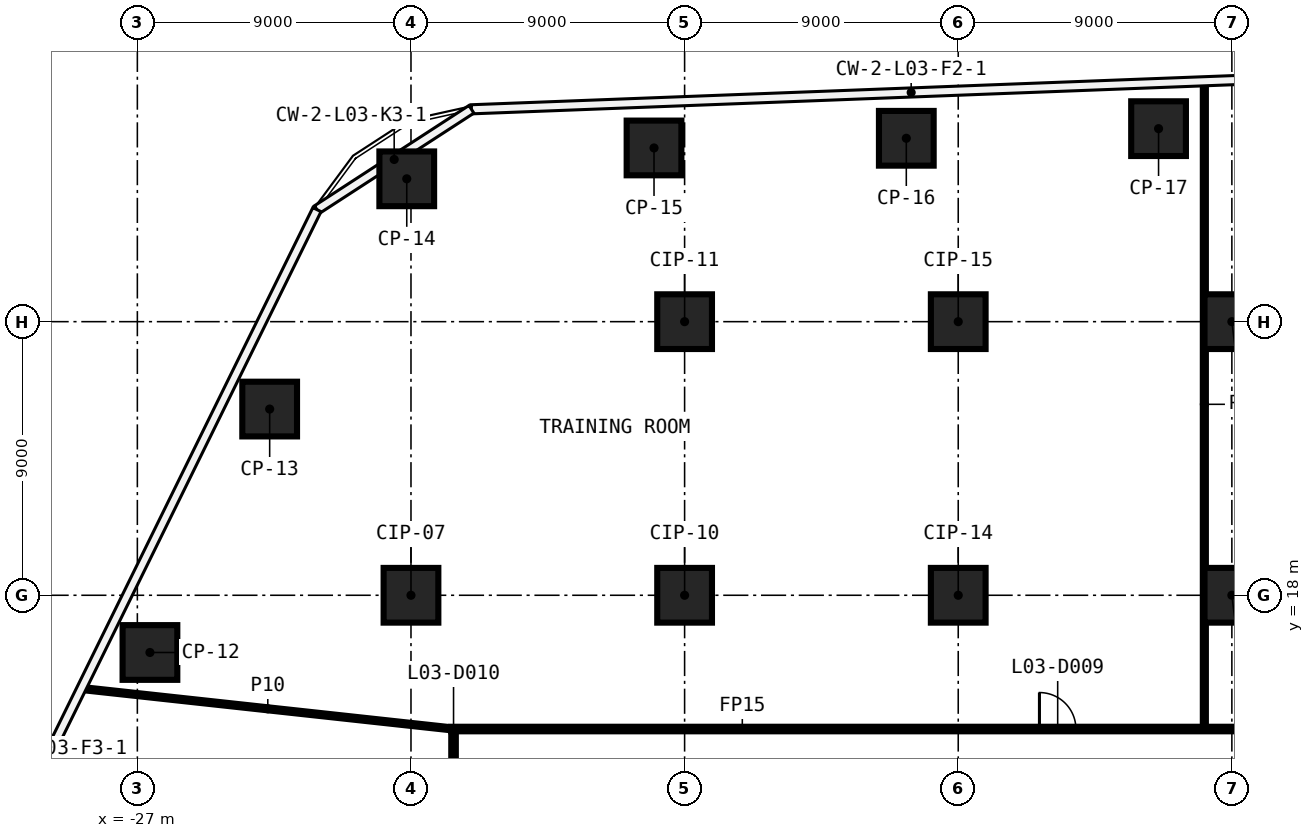
"""IFC4 building model, lengths in metres.
Left out: names, types, materials, properties, quantities, classifications, styles, units other than length and angle.
Written with IfcOpenShell. Run it as: python <this file> out.ifc"""

import sys

from ifc_helpers import new_model, si_unit, direction, frame, frame_2d, origin, origin_2d, place, context, subcontext, project, spatial, rectangle, extrude, element, fill, save


model = new_model("IFC4")
c1 = context("Model", 3, precision=1e-05, world=origin(), true_north=direction((0.0, 1.0)))
c2 = subcontext(c1, "Body", "Model", "MODEL_VIEW")
j1 = project(units=[si_unit("LENGTHUNIT", "METRE"), si_unit("PLANEANGLEUNIT", "RADIAN")], contexts=[c1])
p1 = place(None, origin())
s1 = spatial("IfcSite", under=j1, at=p1, CompositionType="ELEMENT")
p2 = place(p1, origin())
s2 = spatial("IfcBuilding", under=s1, at=p2, CompositionType="ELEMENT")
p3 = place(p2, frame((0.0, 0.0, 27.0)))
s3 = spatial("IfcBuildingStorey", under=s2, at=p3, CompositionType="ELEMENT", Elevation=27.0)
for number, where, z_axis, x_axis in (
    (1, (-26.586, 16.118, 0.0), (0.0, 0.0, 1.0), (1.0, 0.0, 0.0)),
    (2, (-22.648, 24.125, 0.0), (0.0, 0.0, 1.0), (1.0, 0.0, 0.0)),
    (3, (-18.139, 31.699, 0.0), (0.0, 0.0, 1.0), (1.0, 0.0, 0.0)),
    (4, (-10.006, 32.714, 0.0), (0.0, 0.0, 1.0), (1.0, 0.0, 0.0)),
    (5, (-1.708, 33.032, 0.0), (0.0, 0.0, 1.0), (1.0, 0.0, 0.0)),
    (6, (6.589, 33.349, 0.0), (0.0, 0.0, 1.0), (1.0, 0.0, 0.0)),
    (7, (-18.0, 18.0, 0.0), (0.0, 0.0, 1.0), (1.0, 0.0, 0.0)),
    (8, (-9.0, 18.0, 0.0), (0.0, 0.0, 1.0), (1.0, 0.0, 0.0)),
    (9, (-9.0, 27.0, 0.0), (0.0, 0.0, 1.0), (1.0, 0.0, 0.0)),
    (10, (0.0, 18.0, 0.0), (0.0, 0.0, 1.0), (1.0, 0.0, 0.0)),
    (11, (0.0, 27.0, 0.0), (0.0, 0.0, 1.0), (1.0, 0.0, 0.0)),
    (12, (9.0, 18.0, 0.0), (0.0, 0.0, 1.0), (1.0, 0.0, 0.0)),
    (13, (9.0, 27.0, 0.0), (0.0, 0.0, 1.0), (1.0, 0.0, 0.0)),
):
    element("IfcColumn", number, at=place(p3, frame(where, z_axis=z_axis, x_axis=x_axis)), inside=s3, PredefinedType="COLUMN", context=c2, shape_type="SweptSolid", body=[
        extrude(rectangle(XDim=1.8, YDim=1.8, at=origin_2d()), origin(), (0.0, 0.0, 1.0), 5.55),
    ])
p4 = place(p3, frame((-16.675, 13.6, 0.0), z_axis=(0.0, 0.0, 1.0), x_axis=(1.0, 0.0, 0.0)))
e14 = element("IfcWall", 14, at=p4, inside=s3, PredefinedType="PARTITIONING", context=c2, shape_type="SweptSolid", body=[
    extrude(rectangle(XDim=33.35, YDim=0.15, at=frame_2d((16.675, 0.0))), origin(), (0.0, 0.0, 1.0), 5.55),
])
p5 = place(p4, frame((27.447, 0.0, 0.0)))
e15 = element("IfcOpeningElement", 15, at=p5, cuts=e14, PredefinedType="OPENING", context=c2, shape_type="SweptSolid", body=[
    extrude(rectangle(XDim=1.2, YDim=2.1, at=frame_2d((0.6, 1.05))), frame((0.0, 0.085, 0.0), z_axis=(0.0, -1.0, 0.0), x_axis=(1.0, 0.0, 0.0)), (0.0, 0.0, 1.0), 0.17),
])
p6 = place(p4, frame((19.346, 0.0, 0.0)))
e16 = element("IfcOpeningElement", 16, at=p6, cuts=e14, PredefinedType="OPENING", context=c2, shape_type="SweptSolid", body=[
    extrude(rectangle(XDim=1.2, YDim=2.1, at=frame_2d((0.6, 1.05))), frame((0.0, 0.085, 0.0), z_axis=(0.0, -1.0, 0.0), x_axis=(1.0, 0.0, 0.0)), (0.0, 0.0, 1.0), 0.17),
])
p7 = place(p3, frame((8.095, 13.675, 0.0), z_axis=(0.0, 0.0, 1.0), x_axis=(0.0, 1.0, 0.0)))
e17 = element("IfcWall", 17, at=p7, inside=s3, PredefinedType="PARTITIONING", context=c2, shape_type="SweptSolid", body=[
    extrude(rectangle(XDim=21.213, YDim=0.1, at=frame_2d((10.606, 0.0))), origin(), (0.0, 0.0, 1.0), 5.55),
])
p8 = place(p3, frame((-16.6, -13.525, 0.0), z_axis=(0.0, 0.0, 1.0), x_axis=(0.0, 1.0, 0.0)))
e18 = element("IfcWall", 18, at=p8, inside=s3, PredefinedType="PARTITIONING", context=c2, shape_type="SweptSolid", body=[
    extrude(rectangle(XDim=27.05, YDim=0.15, at=frame_2d((13.525, 0.0))), origin(), (0.0, 0.0, 1.0), 5.55),
])
p9 = place(p8, frame((16.028, 0.0, 0.0)))
e19 = element("IfcOpeningElement", 19, at=p9, cuts=e18, PredefinedType="OPENING", context=c2, shape_type="SweptSolid", body=[
    extrude(rectangle(XDim=1.2, YDim=2.1, at=frame_2d((0.6, 1.05))), frame((0.0, 0.085, 0.0), z_axis=(0.0, -1.0, 0.0), x_axis=(1.0, 0.0, 0.0)), (0.0, 0.0, 1.0), 0.17),
])
p10 = place(p8, frame((1.121, 0.0, 0.0)))
e20 = element("IfcOpeningElement", 20, at=p10, cuts=e18, PredefinedType="OPENING", context=c2, shape_type="SweptSolid", body=[
    extrude(rectangle(XDim=1.2, YDim=2.1, at=frame_2d((0.6, 1.05))), frame((0.0, 0.085, 0.0), z_axis=(0.0, -1.0, 0.0), x_axis=(1.0, 0.0, 0.0)), (0.0, 0.0, 1.0), 0.17),
])
p11 = place(p8, frame((24.705, 0.0, 0.0)))
e21 = element("IfcOpeningElement", 21, at=p11, cuts=e18, PredefinedType="OPENING", context=c2, shape_type="SweptSolid", body=[
    extrude(rectangle(XDim=1.2, YDim=2.1, at=frame_2d((0.6, 1.05))), frame((0.0, 0.085, 0.0), z_axis=(0.0, -1.0, 0.0), x_axis=(1.0, 0.0, 0.0)), (0.0, 0.0, 1.0), 0.17),
])
p12 = place(p3, frame((-28.819, 14.931, 0.0), z_axis=(0.0, 0.0, 1.0), x_axis=(0.994112645196, -0.108351505116, 0.0)))
e22 = element("IfcWall", 22, at=p12, inside=s3, PredefinedType="PARTITIONING", context=c2, shape_type="SweptSolid", body=[
    extrude(rectangle(XDim=12.291, YDim=0.1, at=frame_2d((6.146, 0.0))), origin(), (0.0, 0.0, 1.0), 5.55),
])
p13 = place(p6, origin())
e23 = element("IfcDoor", 23, at=p13, inside=s3, OperationType="SINGLE_SWING_RIGHT", PredefinedType="DOOR", context=c2, shape_type="SweptSolid", body=[
    extrude(rectangle(XDim=1.2, YDim=2.1, at=frame_2d((0.6, 1.05))), frame((0.0, 0.025, 0.0), z_axis=(0.0, -1.0, 0.0), x_axis=(1.0, 0.0, 0.0)), (0.0, 0.0, 1.0), 0.05),
])
fill(e16, e23)
save(model, sys.argv[1])
